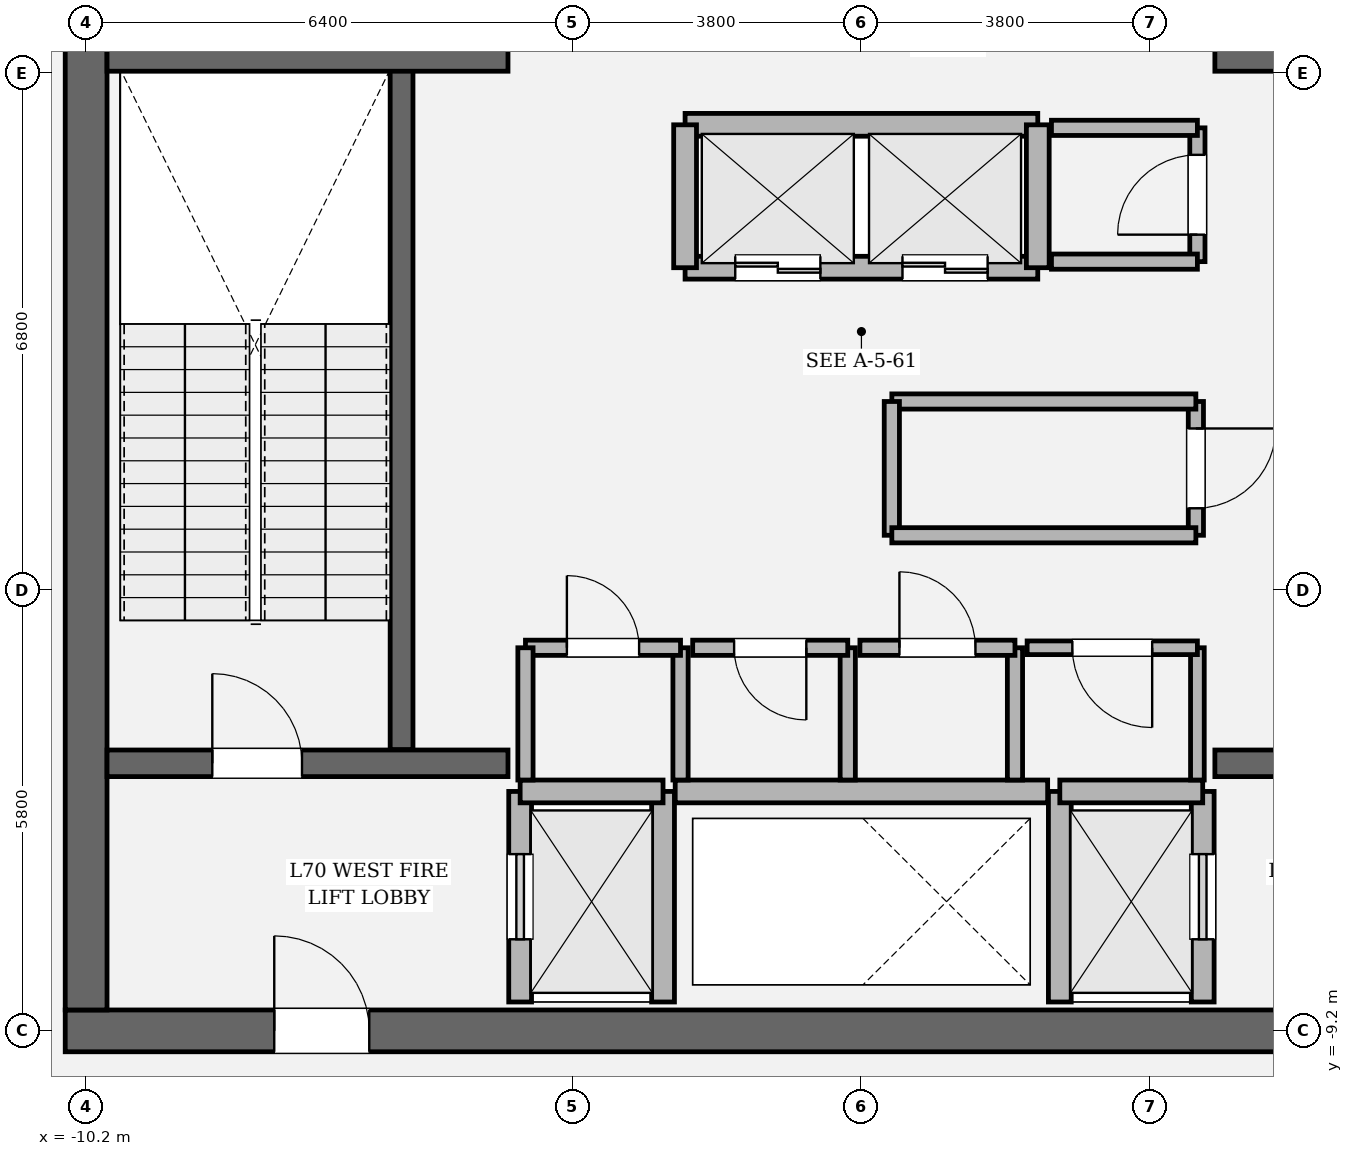
"""IFC4 building model, lengths in metres.
Left out: names, types, materials, properties, quantities, classifications, styles, units other than length and angle.
Written with IfcOpenShell. Run it as: python <this file> out.ifc"""

import sys

from ifc_helpers import new_model, si_unit, direction, frame, frame_2d, origin, place, context, subcontext, project, spatial, rectangle, extrude, element, fill, save


model = new_model("IFC4")
c1 = context("Model", 3, precision=1e-05, world=origin(), true_north=direction((0.0, 1.0)))
c2 = subcontext(c1, "Body", "Model", "MODEL_VIEW")
j1 = project(units=[si_unit("LENGTHUNIT", "METRE"), si_unit("PLANEANGLEUNIT", "RADIAN")], contexts=[c1])
p1 = place(None, origin())
s1 = spatial("IfcSite", under=j1, at=p1, CompositionType="ELEMENT")
p2 = place(p1, origin())
s2 = spatial("IfcBuilding", under=s1, at=p2, CompositionType="ELEMENT")
p3 = place(p2, frame((0.0, 0.0, 296.4)))
s3 = spatial("IfcBuildingStorey", under=s2, at=p3, CompositionType="ELEMENT", Elevation=296.4)
p4 = place(p3, frame((10.475, -9.2, 0.0), z_axis=(0.0, 0.0, 1.0), x_axis=(-1.0, 0.0, 0.0)))
e1 = element("IfcWall", 1, at=p4, inside=s3, PredefinedType="SHEAR", context=c2, shape_type="SweptSolid", body=[
    extrude(rectangle(XDim=20.95, YDim=0.55, at=frame_2d((10.475, 0.0))), origin(), (0.0, 0.0, 1.0), 4.2),
])
p5 = place(p4, frame((2.75, 0.0, 0.0)))
e2 = element("IfcOpeningElement", 2, at=p5, cuts=e1, PredefinedType="OPENING", context=c2, shape_type="SweptSolid", body=[
    extrude(rectangle(XDim=1.25, YDim=2.25, at=frame_2d((0.625, 1.125))), frame((0.0, 0.285, 0.0), z_axis=(0.0, -1.0, 0.0), x_axis=(1.0, 0.0, 0.0)), (0.0, 0.0, 1.0), 0.57),
])
p6 = place(p4, frame((16.95, 0.0, 0.0)))
e3 = element("IfcOpeningElement", 3, at=p6, cuts=e1, PredefinedType="OPENING", context=c2, shape_type="SweptSolid", body=[
    extrude(rectangle(XDim=1.25, YDim=2.25, at=frame_2d((0.625, 1.125))), frame((0.0, 0.285, 0.0), z_axis=(0.0, -1.0, 0.0), x_axis=(1.0, 0.0, 0.0)), (0.0, 0.0, 1.0), 0.57),
])
p7 = place(p3, frame((-10.2, -8.925, 0.0), z_axis=(0.0, 0.0, 1.0), x_axis=(0.0, 1.0, 0.0)))
e4 = element("IfcWall", 4, at=p7, inside=s3, PredefinedType="SHEAR", context=c2, shape_type="SweptSolid", body=[
    extrude(rectangle(XDim=17.85, YDim=0.55, at=frame_2d((8.925, 0.0))), origin(), (0.0, 0.0, 1.0), 4.2),
])
p8 = place(p7, frame((12.715, 0.0, 0.0)))
e5 = element("IfcOpeningElement", 5, at=p8, cuts=e4, PredefinedType="OPENING", context=c2, shape_type="SweptSolid", body=[
    extrude(rectangle(XDim=1.18, YDim=2.2, at=frame_2d((0.59, 1.1))), frame((0.0, 0.285, 0.0), z_axis=(0.0, -1.0, 0.0), x_axis=(1.0, 0.0, 0.0)), (0.0, 0.0, 1.0), 0.57),
])
p9 = place(p3, frame((-6.05, -5.5, 0.0), z_axis=(0.0, 0.0, 1.0), x_axis=(0.0, 1.0, 0.0)))
e6 = element("IfcWall", 6, at=p9, inside=s3, PredefinedType="SOLIDWALL", context=c2, shape_type="SweptSolid", body=[
    extrude(rectangle(XDim=8.95, YDim=0.3, at=frame_2d((4.475, 0.0))), origin(), (0.0, 0.0, 1.0), 4.2),
])
p10 = place(p3, frame((-9.925, -5.68, 0.0), z_axis=(0.0, 0.0, 1.0), x_axis=(1.0, 0.0, 0.0)))
e7 = element("IfcWall", 7, at=p10, inside=s3, PredefinedType="SOLIDWALL", context=c2, shape_type="SweptSolid", body=[
    extrude(rectangle(XDim=5.275, YDim=0.35, at=frame_2d((2.638, 0.0))), origin(), (0.0, 0.0, 1.0), 4.2),
])
p11 = place(p10, frame((1.385, 0.0, 0.0)))
e8 = element("IfcOpeningElement", 8, at=p11, cuts=e7, PredefinedType="OPENING", context=c2, shape_type="SweptSolid", body=[
    extrude(rectangle(XDim=1.18, YDim=2.2, at=frame_2d((0.59, 1.1))), frame((0.0, 0.185, 0.0), z_axis=(0.0, -1.0, 0.0), x_axis=(1.0, 0.0, 0.0)), (0.0, 0.0, 1.0), 0.37),
])
p12 = place(p3, frame((4.65, -5.68, 0.0), z_axis=(0.0, 0.0, 1.0), x_axis=(1.0, 0.0, 0.0)))
e9 = element("IfcWall", 9, at=p12, inside=s3, PredefinedType="SOLIDWALL", context=c2, shape_type="SweptSolid", body=[
    extrude(rectangle(XDim=5.275, YDim=0.35, at=frame_2d((2.638, 0.0))), origin(), (0.0, 0.0, 1.0), 4.2),
])
p13 = place(p12, frame((2.71, 0.0, 0.0)))
e10 = element("IfcOpeningElement", 10, at=p13, cuts=e9, PredefinedType="OPENING", context=c2, shape_type="SweptSolid", body=[
    extrude(rectangle(XDim=1.18, YDim=2.2, at=frame_2d((0.59, 1.1))), frame((0.0, 0.185, 0.0), z_axis=(0.0, -1.0, 0.0), x_axis=(1.0, 0.0, 0.0)), (0.0, 0.0, 1.0), 0.37),
])
for number, where, z_axis, x_axis in (
    (11, (-9.925, 3.6, 0.0), (0.0, 0.0, 1.0), (1.0, 0.0, 0.0)),
    (12, (4.65, 3.6, 0.0), (0.0, 0.0, 1.0), (1.0, 0.0, 0.0)),
):
    element("IfcWall", number, at=place(p3, frame(where, z_axis=z_axis, x_axis=x_axis)), inside=s3, PredefinedType="SOLIDWALL", context=c2, shape_type="SweptSolid", body=[
        extrude(rectangle(XDim=5.275, YDim=0.35, at=frame_2d((2.638, 0.0))), origin(), (0.0, 0.0, 1.0), 4.2),
    ])
p14 = place(p3, frame((-4.49, -8.82, 0.0), z_axis=(0.0, 0.0, 1.0), x_axis=(0.0, 1.0, 0.0)))
e13 = element("IfcWall", 13, at=p14, inside=s3, PredefinedType="SOLIDWALL", context=c2, shape_type="SweptSolid", body=[
    extrude(rectangle(XDim=2.77, YDim=0.3, at=frame_2d((1.385, 0.0))), origin(), (0.0, 0.0, 1.0), 4.0),
])
p15 = place(p14, frame((0.825, 0.0, 0.0)))
e14 = element("IfcOpeningElement", 14, at=p15, cuts=e13, PredefinedType="OPENING", context=c2, shape_type="SweptSolid", body=[
    extrude(rectangle(XDim=1.12, YDim=2.25, at=frame_2d((0.56, 1.125))), frame((0.0, 0.16, 0.0), z_axis=(0.0, -1.0, 0.0), x_axis=(1.0, 0.0, 0.0)), (0.0, 0.0, 1.0), 0.32),
])
p16 = place(p3, frame((-2.61, -8.82, 0.0), z_axis=(0.0, 0.0, 1.0), x_axis=(0.0, 1.0, 0.0)))
e15 = element("IfcWall", 15, at=p16, inside=s3, PredefinedType="SOLIDWALL", context=c2, shape_type="SweptSolid", body=[
    extrude(rectangle(XDim=2.77, YDim=0.3, at=frame_2d((1.385, 0.0))), origin(), (0.0, 0.0, 1.0), 4.0),
])
p17 = place(p3, frame((-4.49, -6.05, 0.0), z_axis=(0.0, 0.0, 1.0), x_axis=(1.0, 0.0, 0.0)))
e16 = element("IfcWall", 16, at=p17, inside=s3, PredefinedType="SOLIDWALL", context=c2, shape_type="SweptSolid", body=[
    extrude(rectangle(XDim=1.88, YDim=0.3, at=frame_2d((0.94, 0.0))), origin(), (0.0, 0.0, 1.0), 4.0),
])
p18 = place(p3, frame((4.49, -8.82, 0.0), z_axis=(0.0, 0.0, 1.0), x_axis=(0.0, 1.0, 0.0)))
e17 = element("IfcWall", 17, at=p18, inside=s3, PredefinedType="SOLIDWALL", context=c2, shape_type="SweptSolid", body=[
    extrude(rectangle(XDim=2.77, YDim=0.3, at=frame_2d((1.385, 0.0))), origin(), (0.0, 0.0, 1.0), 4.0),
])
p19 = place(p18, frame((0.825, 0.0, 0.0)))
e18 = element("IfcOpeningElement", 18, at=p19, cuts=e17, PredefinedType="OPENING", context=c2, shape_type="SweptSolid", body=[
    extrude(rectangle(XDim=1.12, YDim=2.25, at=frame_2d((0.56, 1.125))), frame((0.0, 0.16, 0.0), z_axis=(0.0, -1.0, 0.0), x_axis=(1.0, 0.0, 0.0)), (0.0, 0.0, 1.0), 0.32),
])
p20 = place(p3, frame((2.61, -8.82, 0.0), z_axis=(0.0, 0.0, 1.0), x_axis=(0.0, 1.0, 0.0)))
e19 = element("IfcWall", 19, at=p20, inside=s3, PredefinedType="SOLIDWALL", context=c2, shape_type="SweptSolid", body=[
    extrude(rectangle(XDim=2.77, YDim=0.3, at=frame_2d((1.385, 0.0))), origin(), (0.0, 0.0, 1.0), 4.0),
])
p21 = place(p3, frame((2.61, -6.05, 0.0), z_axis=(0.0, 0.0, 1.0), x_axis=(1.0, 0.0, 0.0)))
e20 = element("IfcWall", 20, at=p21, inside=s3, PredefinedType="SOLIDWALL", context=c2, shape_type="SweptSolid", body=[
    extrude(rectangle(XDim=1.88, YDim=0.3, at=frame_2d((0.94, 0.0))), origin(), (0.0, 0.0, 1.0), 4.0),
])
p22 = place(p3, frame((-2.32, 0.84, 0.0), z_axis=(0.0, 0.0, 1.0), x_axis=(1.0, 0.0, 0.0)))
e21 = element("IfcWall", 21, at=p22, inside=s3, PredefinedType="SOLIDWALL", context=c2, shape_type="SweptSolid", body=[
    extrude(rectangle(XDim=4.64, YDim=0.3, at=frame_2d((2.32, 0.0))), origin(), (0.0, 0.0, 1.0), 4.0),
])
p23 = place(p22, frame((0.66, 0.0, 0.0)))
e22 = element("IfcOpeningElement", 22, at=p23, cuts=e21, PredefinedType="OPENING", context=c2, shape_type="SweptSolid", body=[
    extrude(rectangle(XDim=1.12, YDim=2.25, at=frame_2d((0.56, 1.125))), frame((0.0, 0.16, 0.0), z_axis=(0.0, -1.0, 0.0), x_axis=(1.0, 0.0, 0.0)), (0.0, 0.0, 1.0), 0.32),
])
p24 = place(p22, frame((2.86, 0.0, 0.0)))
e23 = element("IfcOpeningElement", 23, at=p24, cuts=e21, PredefinedType="OPENING", context=c2, shape_type="SweptSolid", body=[
    extrude(rectangle(XDim=1.12, YDim=2.25, at=frame_2d((0.56, 1.125))), frame((0.0, 0.16, 0.0), z_axis=(0.0, -1.0, 0.0), x_axis=(1.0, 0.0, 0.0)), (0.0, 0.0, 1.0), 0.32),
])
p25 = place(p3, frame((-2.32, 2.72, 0.0), z_axis=(0.0, 0.0, 1.0), x_axis=(1.0, 0.0, 0.0)))
e24 = element("IfcWall", 24, at=p25, inside=s3, PredefinedType="SOLIDWALL", context=c2, shape_type="SweptSolid", body=[
    extrude(rectangle(XDim=4.64, YDim=0.3, at=frame_2d((2.32, 0.0))), origin(), (0.0, 0.0, 1.0), 4.0),
])
for number, where, z_axis, x_axis in (
    (25, (-2.32, 0.84, 0.0), (0.0, 0.0, 1.0), (0.0, 1.0, 0.0)),
    (26, (2.32, 0.84, 0.0), (0.0, 0.0, 1.0), (0.0, 1.0, 0.0)),
):
    element("IfcWall", number, at=place(p3, frame(where, z_axis=z_axis, x_axis=x_axis)), inside=s3, PredefinedType="SOLIDWALL", context=c2, shape_type="SweptSolid", body=[
        extrude(rectangle(XDim=1.88, YDim=0.3, at=frame_2d((0.94, 0.0))), origin(), (0.0, 0.0, 1.0), 4.0),
    ])
p26 = place(p3, frame((-2.45, -6.05, 0.0), z_axis=(0.0, 0.0, 1.0), x_axis=(1.0, 0.0, 0.0)))
e27 = element("IfcWall", 27, at=p26, inside=s3, PredefinedType="SOLIDWALL", context=c2, shape_type="SweptSolid", body=[
    extrude(rectangle(XDim=4.9, YDim=0.3, at=frame_2d((2.45, 0.0))), origin(), (0.0, 0.0, 1.0), 4.0),
])
p27 = place(p3, frame((-2.38, -5.9, 0.0), z_axis=(0.0, 0.0, 1.0), x_axis=(0.0, 1.0, 0.0)))
e28 = element("IfcWall", 28, at=p27, inside=s3, PredefinedType="SOLIDWALL", context=c2, shape_type="SweptSolid", body=[
    extrude(rectangle(XDim=1.74, YDim=0.2, at=frame_2d((0.87, 0.0))), origin(), (0.0, 0.0, 1.0), 4.0),
])
p28 = place(p3, frame((-2.38, -4.16, 0.0), z_axis=(0.0, 0.0, 1.0), x_axis=(-1.0, 0.0, 0.0)))
e29 = element("IfcWall", 29, at=p28, inside=s3, PredefinedType="SOLIDWALL", context=c2, shape_type="SweptSolid", body=[
    extrude(rectangle(XDim=2.04, YDim=0.2, at=frame_2d((1.02, 0.0))), origin(), (0.0, 0.0, 1.0), 4.0),
])
p29 = place(p28, frame((0.545, 0.0, 0.0)))
e30 = element("IfcOpeningElement", 30, at=p29, cuts=e29, PredefinedType="OPENING", context=c2, shape_type="SweptSolid", body=[
    extrude(rectangle(XDim=0.95, YDim=2.15, at=frame_2d((0.475, 1.075))), frame((0.0, 0.11, 0.0), z_axis=(0.0, -1.0, 0.0), x_axis=(1.0, 0.0, 0.0)), (0.0, 0.0, 1.0), 0.22),
])
for number, where, z_axis, x_axis in (
    (31, (-4.42, -4.16, 0.0), (0.0, 0.0, 1.0), (0.0, -1.0, 0.0)),
    (32, (-0.18, -5.9, 0.0), (0.0, 0.0, 1.0), (0.0, 1.0, 0.0)),
):
    element("IfcWall", number, at=place(p3, frame(where, z_axis=z_axis, x_axis=x_axis)), inside=s3, PredefinedType="SOLIDWALL", context=c2, shape_type="SweptSolid", body=[
        extrude(rectangle(XDim=1.74, YDim=0.2, at=frame_2d((0.87, 0.0))), origin(), (0.0, 0.0, 1.0), 4.0),
    ])
p30 = place(p3, frame((-0.18, -4.16, 0.0), z_axis=(0.0, 0.0, 1.0), x_axis=(-1.0, 0.0, 0.0)))
e33 = element("IfcWall", 33, at=p30, inside=s3, PredefinedType="SOLIDWALL", context=c2, shape_type="SweptSolid", body=[
    extrude(rectangle(XDim=2.04, YDim=0.2, at=frame_2d((1.02, 0.0))), origin(), (0.0, 0.0, 1.0), 4.0),
])
p31 = place(p30, frame((0.545, 0.0, 0.0)))
e34 = element("IfcOpeningElement", 34, at=p31, cuts=e33, PredefinedType="OPENING", context=c2, shape_type="SweptSolid", body=[
    extrude(rectangle(XDim=0.95, YDim=2.15, at=frame_2d((0.475, 1.075))), frame((0.0, 0.11, 0.0), z_axis=(0.0, -1.0, 0.0), x_axis=(1.0, 0.0, 0.0)), (0.0, 0.0, 1.0), 0.22),
])
p32 = place(p3, frame((2.02, -5.9, 0.0), z_axis=(0.0, 0.0, 1.0), x_axis=(0.0, 1.0, 0.0)))
e35 = element("IfcWall", 35, at=p32, inside=s3, PredefinedType="SOLIDWALL", context=c2, shape_type="SweptSolid", body=[
    extrude(rectangle(XDim=1.74, YDim=0.2, at=frame_2d((0.87, 0.0))), origin(), (0.0, 0.0, 1.0), 4.0),
])
p33 = place(p3, frame((2.02, -4.16, 0.0), z_axis=(0.0, 0.0, 1.0), x_axis=(-1.0, 0.0, 0.0)))
e36 = element("IfcWall", 36, at=p33, inside=s3, PredefinedType="SOLIDWALL", context=c2, shape_type="SweptSolid", body=[
    extrude(rectangle(XDim=2.04, YDim=0.2, at=frame_2d((1.02, 0.0))), origin(), (0.0, 0.0, 1.0), 4.0),
])
p34 = place(p33, frame((0.52, 0.0, 0.0)))
e37 = element("IfcOpeningElement", 37, at=p34, cuts=e36, PredefinedType="OPENING", context=c2, shape_type="SweptSolid", body=[
    extrude(rectangle(XDim=1.0, YDim=2.15, at=frame_2d((0.5, 1.075))), frame((0.0, 0.11, 0.0), z_axis=(0.0, -1.0, 0.0), x_axis=(1.0, 0.0, 0.0)), (0.0, 0.0, 1.0), 0.22),
])
p35 = place(p3, frame((4.42, -5.9, 0.0), z_axis=(0.0, 0.0, 1.0), x_axis=(0.0, 1.0, 0.0)))
e38 = element("IfcWall", 38, at=p35, inside=s3, PredefinedType="PARTITIONING", context=c2, shape_type="SweptSolid", body=[
    extrude(rectangle(XDim=1.74, YDim=0.18, at=frame_2d((0.87, 0.0))), origin(), (0.0, 0.0, 1.0), 4.0),
])
p36 = place(p3, frame((4.42, -4.16, 0.0), z_axis=(0.0, 0.0, 1.0), x_axis=(-1.0, 0.0, 0.0)))
e39 = element("IfcWall", 39, at=p36, inside=s3, PredefinedType="PARTITIONING", context=c2, shape_type="SweptSolid", body=[
    extrude(rectangle(XDim=2.24, YDim=0.18, at=frame_2d((1.12, 0.0))), origin(), (0.0, 0.0, 1.0), 4.0),
])
p37 = place(p36, frame((0.595, 0.0, 0.0)))
e40 = element("IfcOpeningElement", 40, at=p37, cuts=e39, PredefinedType="OPENING", context=c2, shape_type="SweptSolid", body=[
    extrude(rectangle(XDim=1.05, YDim=2.2, at=frame_2d((0.525, 1.1))), frame((0.0, 0.1, 0.0), z_axis=(0.0, -1.0, 0.0), x_axis=(1.0, 0.0, 0.0)), (0.0, 0.0, 1.0), 0.2),
])
p38 = place(p3, frame((4.4, -2.68, 0.0), z_axis=(0.0, 0.0, 1.0), x_axis=(0.0, 1.0, 0.0)))
e41 = element("IfcWall", 41, at=p38, inside=s3, PredefinedType="SOLIDWALL", context=c2, shape_type="SweptSolid", body=[
    extrude(rectangle(XDim=1.76, YDim=0.2, at=frame_2d((0.88, 0.0))), origin(), (0.0, 0.0, 1.0), 4.0),
])
p39 = place(p38, frame((0.355, 0.0, 0.0)))
e42 = element("IfcOpeningElement", 42, at=p39, cuts=e41, PredefinedType="OPENING", context=c2, shape_type="SweptSolid", body=[
    extrude(rectangle(XDim=1.05, YDim=2.2, at=frame_2d((0.525, 1.1))), frame((0.0, 0.11, 0.0), z_axis=(0.0, -1.0, 0.0), x_axis=(1.0, 0.0, 0.0)), (0.0, 0.0, 1.0), 0.22),
])
p40 = place(p3, frame((4.4, -0.92, 0.0), z_axis=(0.0, 0.0, 1.0), x_axis=(-1.0, 0.0, 0.0)))
e43 = element("IfcWall", 43, at=p40, inside=s3, PredefinedType="SOLIDWALL", context=c2, shape_type="SweptSolid", body=[
    extrude(rectangle(XDim=4.0, YDim=0.2, at=frame_2d((2.0, 0.0))), origin(), (0.0, 0.0, 1.0), 4.0),
])
p41 = place(p3, frame((0.4, -0.92, 0.0), z_axis=(0.0, 0.0, 1.0), x_axis=(0.0, -1.0, 0.0)))
e44 = element("IfcWall", 44, at=p41, inside=s3, PredefinedType="SOLIDWALL", context=c2, shape_type="SweptSolid", body=[
    extrude(rectangle(XDim=1.76, YDim=0.2, at=frame_2d((0.88, 0.0))), origin(), (0.0, 0.0, 1.0), 4.0),
])
p42 = place(p3, frame((0.4, -2.68, 0.0), z_axis=(0.0, 0.0, 1.0), x_axis=(1.0, 0.0, 0.0)))
e45 = element("IfcWall", 45, at=p42, inside=s3, PredefinedType="SOLIDWALL", context=c2, shape_type="SweptSolid", body=[
    extrude(rectangle(XDim=4.0, YDim=0.2, at=frame_2d((2.0, 0.0))), origin(), (0.0, 0.0, 1.0), 4.0),
])
p43 = place(p3, frame((4.42, 0.92, 0.0), z_axis=(0.0, 0.0, 1.0), x_axis=(0.0, 1.0, 0.0)))
e46 = element("IfcWall", 46, at=p43, inside=s3, PredefinedType="SOLIDWALL", context=c2, shape_type="SweptSolid", body=[
    extrude(rectangle(XDim=1.76, YDim=0.2, at=frame_2d((0.88, 0.0))), origin(), (0.0, 0.0, 1.0), 4.0),
])
p44 = place(p43, frame((0.355, 0.0, 0.0)))
e47 = element("IfcOpeningElement", 47, at=p44, cuts=e46, PredefinedType="OPENING", context=c2, shape_type="SweptSolid", body=[
    extrude(rectangle(XDim=1.05, YDim=2.2, at=frame_2d((0.525, 1.1))), frame((0.0, 0.11, 0.0), z_axis=(0.0, -1.0, 0.0), x_axis=(1.0, 0.0, 0.0)), (0.0, 0.0, 1.0), 0.22),
])
for number, where, z_axis, x_axis in (
    (48, (4.42, 2.68, 0.0), (0.0, 0.0, 1.0), (-1.0, 0.0, 0.0)),
    (49, (2.5, 0.92, 0.0), (0.0, 0.0, 1.0), (1.0, 0.0, 0.0)),
):
    element("IfcWall", number, at=place(p3, frame(where, z_axis=z_axis, x_axis=x_axis)), inside=s3, PredefinedType="SOLIDWALL", context=c2, shape_type="SweptSolid", body=[
        extrude(rectangle(XDim=1.92, YDim=0.2, at=frame_2d((0.96, 0.0))), origin(), (0.0, 0.0, 1.0), 4.0),
    ])
p45 = place(p11, origin())
e50 = element("IfcDoor", 50, at=p45, inside=s3, OperationType="SINGLE_SWING_LEFT", PredefinedType="DOOR", context=c2, shape_type="SweptSolid", body=[
    extrude(rectangle(XDim=1.18, YDim=2.2, at=frame_2d((0.59, 1.1))), frame((0.0, 0.025, 0.0), z_axis=(0.0, -1.0, 0.0), x_axis=(1.0, 0.0, 0.0)), (0.0, 0.0, 1.0), 0.05),
])
fill(e8, e50)
p46 = place(p6, origin())
e51 = element("IfcDoor", 51, at=p46, inside=s3, OperationType="SINGLE_SWING_RIGHT", PredefinedType="DOOR", context=c2, shape_type="SweptSolid", body=[
    extrude(rectangle(XDim=1.25, YDim=2.25, at=frame_2d((0.625, 1.125))), frame((0.0, 0.025, 0.0), z_axis=(0.0, -1.0, 0.0), x_axis=(1.0, 0.0, 0.0)), (0.0, 0.0, 1.0), 0.05),
])
fill(e3, e51)
p47 = place(p15, origin())
e52 = element("IfcDoor", 52, at=p47, inside=s3, OperationType="SLIDING_TO_LEFT", PredefinedType="DOOR", context=c2, shape_type="SweptSolid", body=[
    extrude(rectangle(XDim=1.12, YDim=2.25, at=frame_2d((0.56, 1.125))), frame((0.0, 0.025, 0.0), z_axis=(0.0, -1.0, 0.0), x_axis=(1.0, 0.0, 0.0)), (0.0, 0.0, 1.0), 0.05),
])
fill(e14, e52)
p48 = place(p19, origin())
e53 = element("IfcDoor", 53, at=p48, inside=s3, OperationType="SLIDING_TO_RIGHT", PredefinedType="DOOR", context=c2, shape_type="SweptSolid", body=[
    extrude(rectangle(XDim=1.12, YDim=2.25, at=frame_2d((0.56, 1.125))), frame((0.0, 0.025, 0.0), z_axis=(0.0, -1.0, 0.0), x_axis=(1.0, 0.0, 0.0)), (0.0, 0.0, 1.0), 0.05),
])
fill(e18, e53)
p49 = place(p23, origin())
e54 = element("IfcDoor", 54, at=p49, inside=s3, OperationType="DOUBLE_DOOR_SLIDING", PredefinedType="DOOR", context=c2, shape_type="SweptSolid", body=[
    extrude(rectangle(XDim=1.12, YDim=2.25, at=frame_2d((0.56, 1.125))), frame((0.0, 0.025, 0.0), z_axis=(0.0, -1.0, 0.0), x_axis=(1.0, 0.0, 0.0)), (0.0, 0.0, 1.0), 0.05),
])
fill(e22, e54)
p50 = place(p24, origin())
e55 = element("IfcDoor", 55, at=p50, inside=s3, OperationType="DOUBLE_DOOR_SLIDING", PredefinedType="DOOR", context=c2, shape_type="SweptSolid", body=[
    extrude(rectangle(XDim=1.12, YDim=2.25, at=frame_2d((0.56, 1.125))), frame((0.0, 0.025, 0.0), z_axis=(0.0, -1.0, 0.0), x_axis=(1.0, 0.0, 0.0)), (0.0, 0.0, 1.0), 0.05),
])
fill(e23, e55)
p51 = place(p29, origin())
e56 = element("IfcDoor", 56, at=p51, inside=s3, OperationType="SINGLE_SWING_RIGHT", PredefinedType="DOOR", context=c2, shape_type="SweptSolid", body=[
    extrude(rectangle(XDim=0.95, YDim=2.15, at=frame_2d((0.475, 1.075))), frame((0.0, 0.025, 0.0), z_axis=(0.0, -1.0, 0.0), x_axis=(1.0, 0.0, 0.0)), (0.0, 0.0, 1.0), 0.05),
])
fill(e30, e56)
p52 = place(p31, origin())
e57 = element("IfcDoor", 57, at=p52, inside=s3, OperationType="SINGLE_SWING_LEFT", PredefinedType="DOOR", context=c2, shape_type="SweptSolid", body=[
    extrude(rectangle(XDim=0.95, YDim=2.15, at=frame_2d((0.475, 1.075))), frame((0.0, 0.025, 0.0), z_axis=(0.0, -1.0, 0.0), x_axis=(1.0, 0.0, 0.0)), (0.0, 0.0, 1.0), 0.05),
])
fill(e34, e57)
p53 = place(p34, origin())
e58 = element("IfcDoor", 58, at=p53, inside=s3, OperationType="SINGLE_SWING_RIGHT", PredefinedType="DOOR", context=c2, shape_type="SweptSolid", body=[
    extrude(rectangle(XDim=1.0, YDim=2.15, at=frame_2d((0.5, 1.075))), frame((0.0, 0.025, 0.0), z_axis=(0.0, -1.0, 0.0), x_axis=(1.0, 0.0, 0.0)), (0.0, 0.0, 1.0), 0.05),
])
fill(e37, e58)
p54 = place(p37, origin())
e59 = element("IfcDoor", 59, at=p54, inside=s3, OperationType="SINGLE_SWING_LEFT", PredefinedType="DOOR", context=c2, shape_type="SweptSolid", body=[
    extrude(rectangle(XDim=1.05, YDim=2.2, at=frame_2d((0.525, 1.1))), frame((0.0, 0.025, 0.0), z_axis=(0.0, -1.0, 0.0), x_axis=(1.0, 0.0, 0.0)), (0.0, 0.0, 1.0), 0.05),
])
fill(e40, e59)
p55 = place(p39, origin())
e60 = element("IfcDoor", 60, at=p55, inside=s3, OperationType="SINGLE_SWING_RIGHT", PredefinedType="DOOR", context=c2, shape_type="SweptSolid", body=[
    extrude(rectangle(XDim=1.05, YDim=2.2, at=frame_2d((0.525, 1.1))), frame((0.0, 0.025, 0.0), z_axis=(0.0, -1.0, 0.0), x_axis=(1.0, 0.0, 0.0)), (0.0, 0.0, 1.0), 0.05),
])
fill(e42, e60)
p56 = place(p44, origin())
e61 = element("IfcDoor", 61, at=p56, inside=s3, OperationType="SINGLE_SWING_LEFT", PredefinedType="DOOR", context=c2, shape_type="SweptSolid", body=[
    extrude(rectangle(XDim=1.05, YDim=2.2, at=frame_2d((0.525, 1.1))), frame((0.0, 0.025, 0.0), z_axis=(0.0, -1.0, 0.0), x_axis=(1.0, 0.0, 0.0)), (0.0, 0.0, 1.0), 0.05),
])
fill(e47, e61)
save(model, sys.argv[1])
